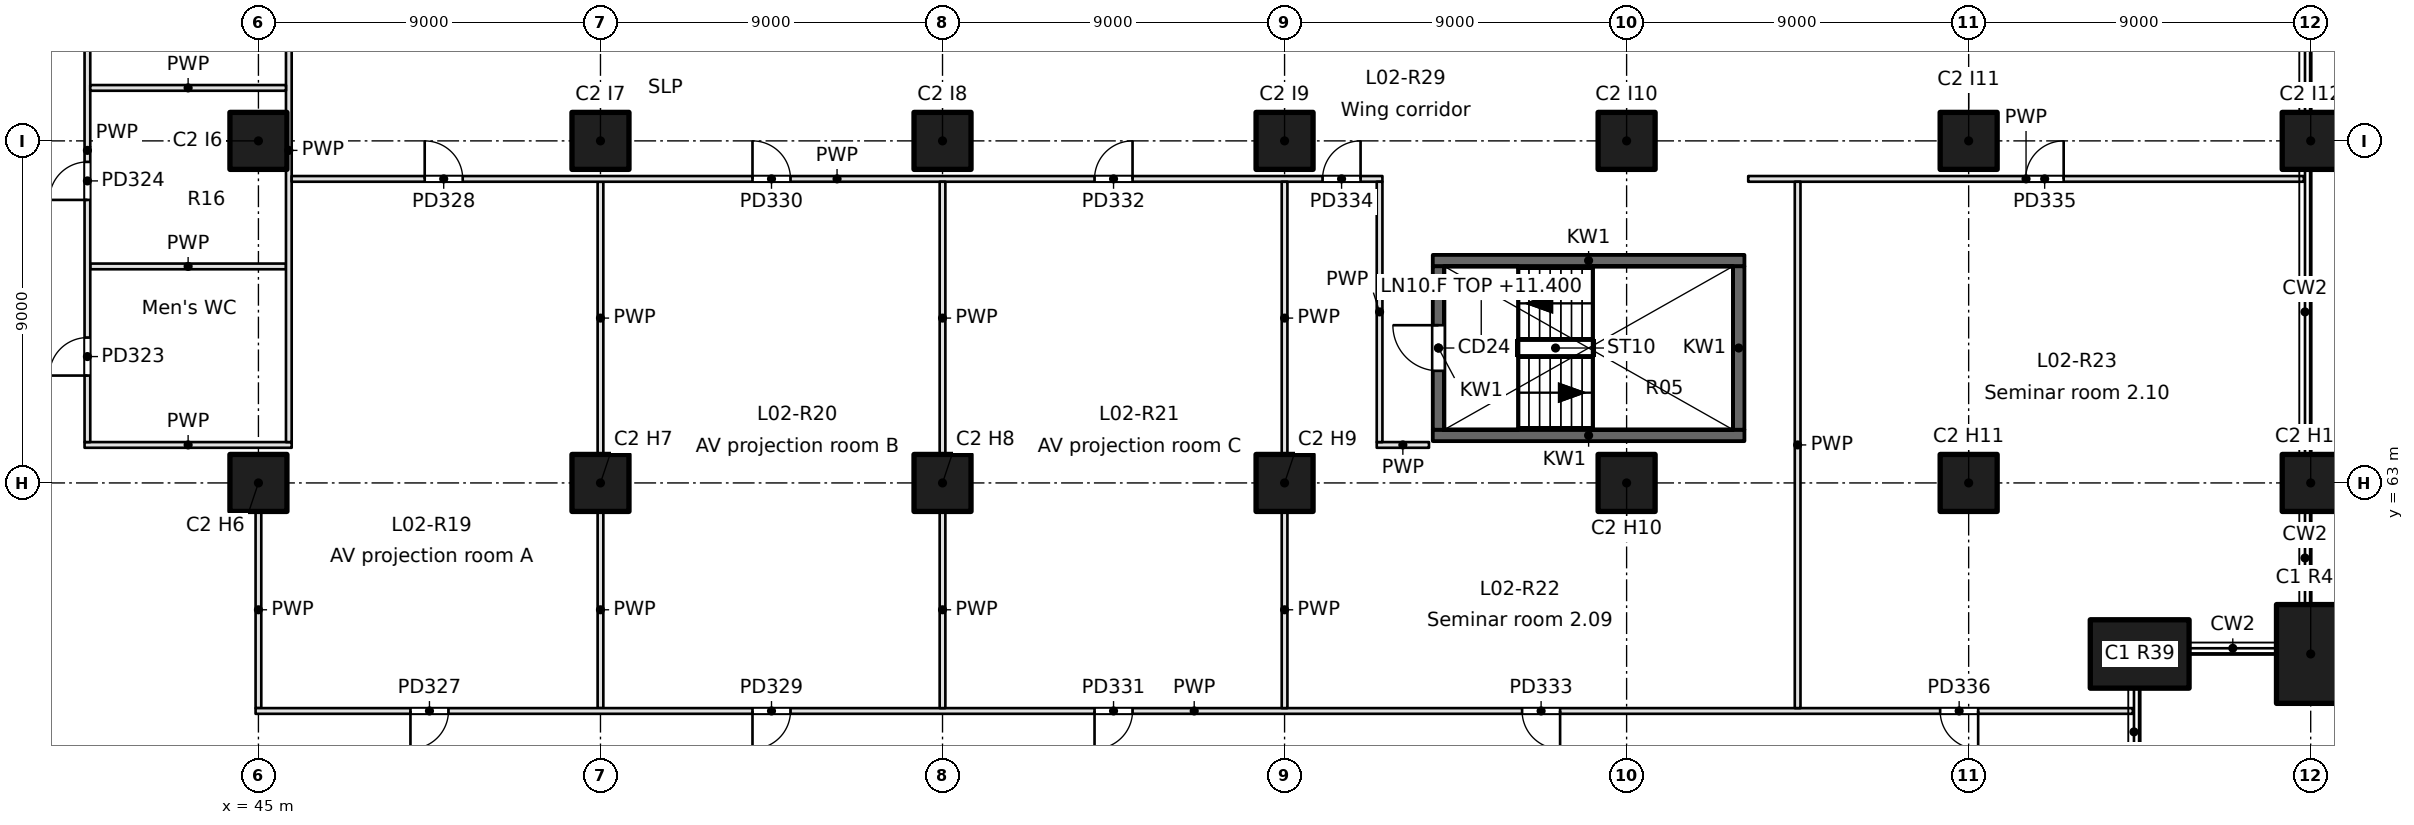
"""IFC4 building model, lengths in metres.
Left out: names, types, materials, properties, quantities, classifications, styles, units other than length and angle.
Written with IfcOpenShell. Run it as: python <this file> out.ifc"""

import sys

from ifc_helpers import new_model, si_unit, direction, frame, frame_2d, origin, origin_2d, place, context, subcontext, project, spatial, rectangle, extrude, element, fill, save


model = new_model("IFC4")
c1 = context("Model", 3, precision=1e-05, world=origin(), true_north=direction((0.0, 1.0)))
c2 = subcontext(c1, "Body", "Model", "MODEL_VIEW")
j1 = project(units=[si_unit("LENGTHUNIT", "METRE"), si_unit("PLANEANGLEUNIT", "RADIAN")], contexts=[c1])
p1 = place(None, origin())
s1 = spatial("IfcSite", under=j1, at=p1, CompositionType="ELEMENT")
p2 = place(p1, origin())
s2 = spatial("IfcBuilding", under=s1, at=p2, CompositionType="ELEMENT")
p3 = place(p2, frame((0.0, 0.0, 11.4)))
s3 = spatial("IfcBuildingStorey", under=s2, at=p3, CompositionType="ELEMENT", Elevation=11.4)
for number, where, z_axis, x_axis in (
    (1, (94.5, 58.5, 0.0), (0.0, 0.0, 1.0), (1.0, 0.0, 0.0)),
    (2, (99.0, 58.5, 0.0), (0.0, 0.0, 1.0), (0.0, 1.0, 0.0)),
):
    element("IfcColumn", number, at=place(p3, frame(where, z_axis=z_axis, x_axis=x_axis)), inside=s3, PredefinedType="COLUMN", context=c2, shape_type="SweptSolid", body=[
        extrude(rectangle(XDim=2.6, YDim=1.8, at=origin_2d()), origin(), (0.0, 0.0, 1.0), 5.4),
    ])
for number, where, z_axis, x_axis in (
    (3, (99.0, 63.0, 0.0), (0.0, 0.0, 1.0), (1.0, 0.0, 0.0)),
    (4, (99.0, 72.0, 0.0), (0.0, 0.0, 1.0), (1.0, 0.0, 0.0)),
    (5, (45.0, 63.0, 0.0), (0.0, 0.0, 1.0), (1.0, 0.0, 0.0)),
    (6, (45.0, 72.0, 0.0), (0.0, 0.0, 1.0), (1.0, 0.0, 0.0)),
    (7, (54.0, 63.0, 0.0), (0.0, 0.0, 1.0), (1.0, 0.0, 0.0)),
    (8, (54.0, 72.0, 0.0), (0.0, 0.0, 1.0), (1.0, 0.0, 0.0)),
    (9, (63.0, 63.0, 0.0), (0.0, 0.0, 1.0), (1.0, 0.0, 0.0)),
    (10, (63.0, 72.0, 0.0), (0.0, 0.0, 1.0), (1.0, 0.0, 0.0)),
    (11, (72.0, 63.0, 0.0), (0.0, 0.0, 1.0), (1.0, 0.0, 0.0)),
    (12, (72.0, 72.0, 0.0), (0.0, 0.0, 1.0), (1.0, 0.0, 0.0)),
    (13, (81.0, 63.0, 0.0), (0.0, 0.0, 1.0), (1.0, 0.0, 0.0)),
    (14, (81.0, 72.0, 0.0), (0.0, 0.0, 1.0), (1.0, 0.0, 0.0)),
    (15, (90.0, 63.0, 0.0), (0.0, 0.0, 1.0), (1.0, 0.0, 0.0)),
    (16, (90.0, 72.0, 0.0), (0.0, 0.0, 1.0), (1.0, 0.0, 0.0)),
):
    element("IfcColumn", number, at=place(p3, frame(where, z_axis=z_axis, x_axis=x_axis)), inside=s3, PredefinedType="COLUMN", context=c2, shape_type="SweptSolid", body=[
        extrude(rectangle(XDim=1.5, YDim=1.5, at=origin_2d()), origin(), (0.0, 0.0, 1.0), 5.4),
    ])
for number, where, z_axis, x_axis in (
    (17, (75.9, 64.25, -0.35), (0.0, 0.0, 1.0), (1.0, 0.0, 0.0)),
    (18, (75.9, 68.85, -0.35), (0.0, 0.0, 1.0), (1.0, 0.0, 0.0)),
):
    element("IfcWall", number, at=place(p3, frame(where, z_axis=z_axis, x_axis=x_axis)), inside=s3, PredefinedType="SOLIDWALL", context=c2, shape_type="SweptSolid", body=[
        extrude(rectangle(XDim=8.2, YDim=0.3, at=frame_2d((4.1, 0.0))), origin(), (0.0, 0.0, 1.0), 5.4),
    ])
p4 = place(p3, frame((76.05, 64.4, -0.35), z_axis=(0.0, 0.0, 1.0), x_axis=(0.0, 1.0, 0.0)))
e19 = element("IfcWall", 19, at=p4, inside=s3, PredefinedType="SOLIDWALL", context=c2, shape_type="SweptSolid", body=[
    extrude(rectangle(XDim=4.3, YDim=0.3, at=frame_2d((2.15, 0.0))), origin(), (0.0, 0.0, 1.0), 5.4),
])
p5 = place(p4, frame((1.55, 0.0, 0.35)))
e20 = element("IfcOpeningElement", 20, at=p5, cuts=e19, PredefinedType="OPENING", context=c2, shape_type="SweptSolid", body=[
    extrude(rectangle(XDim=1.2, YDim=2.1, at=frame_2d((0.6, 1.05))), frame((0.0, 0.15, 0.0), z_axis=(0.0, -1.0, 0.0), x_axis=(1.0, 0.0, 0.0)), (0.0, 0.0, 1.0), 0.3),
])
p6 = place(p3, frame((83.95, 64.4, -0.35), z_axis=(0.0, 0.0, 1.0), x_axis=(0.0, 1.0, 0.0)))
e21 = element("IfcWall", 21, at=p6, inside=s3, PredefinedType="SOLIDWALL", context=c2, shape_type="SweptSolid", body=[
    extrude(rectangle(XDim=4.3, YDim=0.3, at=frame_2d((2.15, 0.0))), origin(), (0.0, 0.0, 1.0), 5.4),
])
p7 = place(p3, frame((45.0, 57.075, 0.0), z_axis=(0.0, 0.0, 1.0), x_axis=(0.0, 1.0, 0.0)))
e22 = element("IfcWall", 22, at=p7, inside=s3, PredefinedType="PARTITIONING", context=c2, shape_type="SweptSolid", body=[
    extrude(rectangle(XDim=5.175, YDim=0.15, at=frame_2d((2.587, 0.0))), origin(), (0.0, 0.0, 1.0), 5.05),
])
p8 = place(p3, frame((40.575, 68.697, 0.0), z_axis=(0.0, 0.0, 1.0), x_axis=(1.0, 0.0, 0.0)))
e23 = element("IfcWall", 23, at=p8, inside=s3, PredefinedType="PARTITIONING", context=c2, shape_type="SweptSolid", body=[
    extrude(rectangle(XDim=5.15, YDim=0.15, at=frame_2d((2.575, 0.0))), origin(), (0.0, 0.0, 1.0), 5.05),
])
p9 = place(p3, frame((45.875, 64.0, 0.0), z_axis=(0.0, 0.0, 1.0), x_axis=(-1.0, 0.0, 0.0)))
e24 = element("IfcWall", 24, at=p9, inside=s3, PredefinedType="PARTITIONING", context=c2, shape_type="SweptSolid", body=[
    extrude(rectangle(XDim=5.45, YDim=0.15, at=frame_2d((2.725, 0.0))), origin(), (0.0, 0.0, 1.0), 5.05),
])
p10 = place(p3, frame((74.425, 64.0, 0.0), z_axis=(0.0, 0.0, 1.0), x_axis=(1.0, 0.0, 0.0)))
e25 = element("IfcWall", 25, at=p10, inside=s3, PredefinedType="PARTITIONING", context=c2, shape_type="SweptSolid", body=[
    extrude(rectangle(XDim=1.375, YDim=0.15, at=frame_2d((0.688, 0.0))), origin(), (0.0, 0.0, 1.0), 5.05),
])
p11 = place(p3, frame((45.8, 79.425, 0.0), z_axis=(0.0, 0.0, 1.0), x_axis=(0.0, -1.0, 0.0)))
e26 = element("IfcWall", 26, at=p11, inside=s3, PredefinedType="PARTITIONING", context=c2, shape_type="SweptSolid", body=[
    extrude(rectangle(XDim=15.35, YDim=0.15, at=frame_2d((7.675, 0.0))), origin(), (0.0, 0.0, 1.0), 5.05),
])
p12 = place(p3, frame((40.5, 64.075, 0.0), z_axis=(0.0, 0.0, 1.0), x_axis=(0.0, 1.0, 0.0)))
e27 = element("IfcWall", 27, at=p12, inside=s3, PredefinedType="PARTITIONING", context=c2, shape_type="SweptSolid", body=[
    extrude(rectangle(XDim=15.35, YDim=0.15, at=frame_2d((7.675, 0.0))), origin(), (0.0, 0.0, 1.0), 5.05),
])
p13 = place(p12, frame((1.75, 0.0, 0.0)))
e28 = element("IfcOpeningElement", 28, at=p13, cuts=e27, PredefinedType="OPENING", context=c2, shape_type="SweptSolid", body=[
    extrude(rectangle(XDim=1.0, YDim=2.1, at=frame_2d((0.5, 1.05))), frame((0.0, 0.075, 0.0), z_axis=(0.0, -1.0, 0.0), x_axis=(1.0, 0.0, 0.0)), (0.0, 0.0, 1.0), 0.15),
])
p14 = place(p12, frame((6.372, 0.0, 0.0)))
e29 = element("IfcOpeningElement", 29, at=p14, cuts=e27, PredefinedType="OPENING", context=c2, shape_type="SweptSolid", body=[
    extrude(rectangle(XDim=1.0, YDim=2.1, at=frame_2d((0.5, 1.05))), frame((0.0, 0.075, 0.0), z_axis=(0.0, -1.0, 0.0), x_axis=(1.0, 0.0, 0.0)), (0.0, 0.0, 1.0), 0.15),
])
p15 = place(p12, frame((10.569, 0.0, 0.0)))
e30 = element("IfcOpeningElement", 30, at=p15, cuts=e27, PredefinedType="OPENING", context=c2, shape_type="SweptSolid", body=[
    extrude(rectangle(XDim=1.0, YDim=2.1, at=frame_2d((0.5, 1.05))), frame((0.0, 0.075, 0.0), z_axis=(0.0, -1.0, 0.0), x_axis=(1.0, 0.0, 0.0)), (0.0, 0.0, 1.0), 0.15),
])
p16 = place(p3, frame((40.575, 73.394, 0.0), z_axis=(0.0, 0.0, 1.0), x_axis=(1.0, 0.0, 0.0)))
e31 = element("IfcWall", 31, at=p16, inside=s3, PredefinedType="PARTITIONING", context=c2, shape_type="SweptSolid", body=[
    extrude(rectangle(XDim=5.15, YDim=0.15, at=frame_2d((2.575, 0.0))), origin(), (0.0, 0.0, 1.0), 5.05),
])
p17 = place(p3, frame((54.0, 57.075, 0.0), z_axis=(0.0, 0.0, 1.0), x_axis=(0.0, 1.0, 0.0)))
e32 = element("IfcWall", 32, at=p17, inside=s3, PredefinedType="PARTITIONING", context=c2, shape_type="SweptSolid", body=[
    extrude(rectangle(XDim=5.175, YDim=0.15, at=frame_2d((2.587, 0.0))), origin(), (0.0, 0.0, 1.0), 5.05),
])
p18 = place(p3, frame((54.0, 63.75, 0.0), z_axis=(0.0, 0.0, 1.0), x_axis=(0.0, 1.0, 0.0)))
e33 = element("IfcWall", 33, at=p18, inside=s3, PredefinedType="PARTITIONING", context=c2, shape_type="SweptSolid", body=[
    extrude(rectangle(XDim=7.175, YDim=0.15, at=frame_2d((3.587, 0.0))), origin(), (0.0, 0.0, 1.0), 5.05),
])
p19 = place(p3, frame((94.32, 57.0, 0.0), z_axis=(0.0, 0.0, 1.0), x_axis=(-1.0, 0.0, 0.0)))
e34 = element("IfcWall", 34, at=p19, inside=s3, PredefinedType="PARTITIONING", context=c2, shape_type="SweptSolid", body=[
    extrude(rectangle(XDim=49.395, YDim=0.15, at=frame_2d((24.698, 0.0))), origin(), (0.0, 0.0, 1.0), 5.05),
])
p20 = place(p19, frame((44.32, 0.0, 0.0)))
e35 = element("IfcOpeningElement", 35, at=p20, cuts=e34, PredefinedType="OPENING", context=c2, shape_type="SweptSolid", body=[
    extrude(rectangle(XDim=1.0, YDim=2.1, at=frame_2d((0.5, 1.05))), frame((0.0, 0.075, 0.0), z_axis=(0.0, -1.0, 0.0), x_axis=(1.0, 0.0, 0.0)), (0.0, 0.0, 1.0), 0.15),
])
p21 = place(p19, frame((35.32, 0.0, 0.0)))
e36 = element("IfcOpeningElement", 36, at=p21, cuts=e34, PredefinedType="OPENING", context=c2, shape_type="SweptSolid", body=[
    extrude(rectangle(XDim=1.0, YDim=2.1, at=frame_2d((0.5, 1.05))), frame((0.0, 0.075, 0.0), z_axis=(0.0, -1.0, 0.0), x_axis=(1.0, 0.0, 0.0)), (0.0, 0.0, 1.0), 0.15),
])
p22 = place(p19, frame((26.32, 0.0, 0.0)))
e37 = element("IfcOpeningElement", 37, at=p22, cuts=e34, PredefinedType="OPENING", context=c2, shape_type="SweptSolid", body=[
    extrude(rectangle(XDim=1.0, YDim=2.1, at=frame_2d((0.5, 1.05))), frame((0.0, 0.075, 0.0), z_axis=(0.0, -1.0, 0.0), x_axis=(1.0, 0.0, 0.0)), (0.0, 0.0, 1.0), 0.15),
])
p23 = place(p19, frame((15.07, 0.0, 0.0)))
e38 = element("IfcOpeningElement", 38, at=p23, cuts=e34, PredefinedType="OPENING", context=c2, shape_type="SweptSolid", body=[
    extrude(rectangle(XDim=1.0, YDim=2.1, at=frame_2d((0.5, 1.05))), frame((0.0, 0.075, 0.0), z_axis=(0.0, -1.0, 0.0), x_axis=(1.0, 0.0, 0.0)), (0.0, 0.0, 1.0), 0.15),
])
p24 = place(p19, frame((4.07, 0.0, 0.0)))
e39 = element("IfcOpeningElement", 39, at=p24, cuts=e34, PredefinedType="OPENING", context=c2, shape_type="SweptSolid", body=[
    extrude(rectangle(XDim=1.0, YDim=2.1, at=frame_2d((0.5, 1.05))), frame((0.0, 0.075, 0.0), z_axis=(0.0, -1.0, 0.0), x_axis=(1.0, 0.0, 0.0)), (0.0, 0.0, 1.0), 0.15),
])
p25 = place(p3, frame((45.875, 71.0, 0.0), z_axis=(0.0, 0.0, 1.0), x_axis=(1.0, 0.0, 0.0)))
e40 = element("IfcWall", 40, at=p25, inside=s3, PredefinedType="PARTITIONING", context=c2, shape_type="SweptSolid", body=[
    extrude(rectangle(XDim=28.7, YDim=0.15, at=frame_2d((14.35, 0.0))), origin(), (0.0, 0.0, 1.0), 5.05),
])
p26 = place(p25, frame((3.5, 0.0, 0.0)))
e41 = element("IfcOpeningElement", 41, at=p26, cuts=e40, PredefinedType="OPENING", context=c2, shape_type="SweptSolid", body=[
    extrude(rectangle(XDim=1.0, YDim=2.1, at=frame_2d((0.5, 1.05))), frame((0.0, 0.075, 0.0), z_axis=(0.0, -1.0, 0.0), x_axis=(1.0, 0.0, 0.0)), (0.0, 0.0, 1.0), 0.15),
])
p27 = place(p25, frame((12.125, 0.0, 0.0)))
e42 = element("IfcOpeningElement", 42, at=p27, cuts=e40, PredefinedType="OPENING", context=c2, shape_type="SweptSolid", body=[
    extrude(rectangle(XDim=1.0, YDim=2.1, at=frame_2d((0.5, 1.05))), frame((0.0, 0.075, 0.0), z_axis=(0.0, -1.0, 0.0), x_axis=(1.0, 0.0, 0.0)), (0.0, 0.0, 1.0), 0.15),
])
p28 = place(p25, frame((21.125, 0.0, 0.0)))
e43 = element("IfcOpeningElement", 43, at=p28, cuts=e40, PredefinedType="OPENING", context=c2, shape_type="SweptSolid", body=[
    extrude(rectangle(XDim=1.0, YDim=2.1, at=frame_2d((0.5, 1.05))), frame((0.0, 0.075, 0.0), z_axis=(0.0, -1.0, 0.0), x_axis=(1.0, 0.0, 0.0)), (0.0, 0.0, 1.0), 0.15),
])
p29 = place(p25, frame((27.125, 0.0, 0.0)))
e44 = element("IfcOpeningElement", 44, at=p29, cuts=e40, PredefinedType="OPENING", context=c2, shape_type="SweptSolid", body=[
    extrude(rectangle(XDim=1.0, YDim=2.1, at=frame_2d((0.5, 1.05))), frame((0.0, 0.075, 0.0), z_axis=(0.0, -1.0, 0.0), x_axis=(1.0, 0.0, 0.0)), (0.0, 0.0, 1.0), 0.15),
])
p30 = place(p3, frame((84.2, 71.0, 0.0), z_axis=(0.0, 0.0, 1.0), x_axis=(1.0, 0.0, 0.0)))
e45 = element("IfcWall", 45, at=p30, inside=s3, PredefinedType="PARTITIONING", context=c2, shape_type="SweptSolid", body=[
    extrude(rectangle(XDim=14.62, YDim=0.15, at=frame_2d((7.31, 0.0))), origin(), (0.0, 0.0, 1.0), 5.05),
])
p31 = place(p30, frame((7.3, 0.0, 0.0)))
e46 = element("IfcOpeningElement", 46, at=p31, cuts=e45, PredefinedType="OPENING", context=c2, shape_type="SweptSolid", body=[
    extrude(rectangle(XDim=1.0, YDim=2.1, at=frame_2d((0.5, 1.05))), frame((0.0, 0.075, 0.0), z_axis=(0.0, -1.0, 0.0), x_axis=(1.0, 0.0, 0.0)), (0.0, 0.0, 1.0), 0.15),
])
p32 = place(p3, frame((63.0, 57.075, 0.0), z_axis=(0.0, 0.0, 1.0), x_axis=(0.0, 1.0, 0.0)))
e47 = element("IfcWall", 47, at=p32, inside=s3, PredefinedType="PARTITIONING", context=c2, shape_type="SweptSolid", body=[
    extrude(rectangle(XDim=5.175, YDim=0.15, at=frame_2d((2.587, 0.0))), origin(), (0.0, 0.0, 1.0), 5.05),
])
p33 = place(p3, frame((63.0, 63.75, 0.0), z_axis=(0.0, 0.0, 1.0), x_axis=(0.0, 1.0, 0.0)))
e48 = element("IfcWall", 48, at=p33, inside=s3, PredefinedType="PARTITIONING", context=c2, shape_type="SweptSolid", body=[
    extrude(rectangle(XDim=7.175, YDim=0.15, at=frame_2d((3.587, 0.0))), origin(), (0.0, 0.0, 1.0), 5.05),
])
p34 = place(p3, frame((72.0, 57.075, 0.0), z_axis=(0.0, 0.0, 1.0), x_axis=(0.0, 1.0, 0.0)))
e49 = element("IfcWall", 49, at=p34, inside=s3, PredefinedType="PARTITIONING", context=c2, shape_type="SweptSolid", body=[
    extrude(rectangle(XDim=5.175, YDim=0.15, at=frame_2d((2.587, 0.0))), origin(), (0.0, 0.0, 1.0), 5.05),
])
p35 = place(p3, frame((72.0, 63.75, 0.0), z_axis=(0.0, 0.0, 1.0), x_axis=(0.0, 1.0, 0.0)))
e50 = element("IfcWall", 50, at=p35, inside=s3, PredefinedType="PARTITIONING", context=c2, shape_type="SweptSolid", body=[
    extrude(rectangle(XDim=7.175, YDim=0.15, at=frame_2d((3.587, 0.0))), origin(), (0.0, 0.0, 1.0), 5.05),
])
p36 = place(p3, frame((85.5, 57.075, 0.0), z_axis=(0.0, 0.0, 1.0), x_axis=(0.0, 1.0, 0.0)))
e51 = element("IfcWall", 51, at=p36, inside=s3, PredefinedType="PARTITIONING", context=c2, shape_type="SweptSolid", body=[
    extrude(rectangle(XDim=13.85, YDim=0.15, at=frame_2d((6.925, 0.0))), origin(), (0.0, 0.0, 1.0), 5.05),
])
p37 = place(p3, frame((74.5, 70.925, 0.0), z_axis=(0.0, 0.0, 1.0), x_axis=(0.0, -1.0, 0.0)))
e52 = element("IfcWall", 52, at=p37, inside=s3, PredefinedType="PARTITIONING", context=c2, shape_type="SweptSolid", body=[
    extrude(rectangle(XDim=6.85, YDim=0.15, at=frame_2d((3.425, 0.0))), origin(), (0.0, 0.0, 1.0), 5.05),
])
p38 = place(p5, origin())
e53 = element("IfcDoor", 53, at=p38, inside=s3, OperationType="SINGLE_SWING_RIGHT", PredefinedType="DOOR", context=c2, shape_type="SweptSolid", body=[
    extrude(rectangle(XDim=1.2, YDim=2.1, at=frame_2d((0.6, 1.05))), frame((0.0, 0.025, 0.0), z_axis=(0.0, -1.0, 0.0), x_axis=(1.0, 0.0, 0.0)), (0.0, 0.0, 1.0), 0.05),
])
fill(e20, e53)
p39 = place(p13, origin())
e54 = element("IfcDoor", 54, at=p39, inside=s3, OperationType="SINGLE_SWING_LEFT", PredefinedType="DOOR", context=c2, shape_type="SweptSolid", body=[
    extrude(rectangle(XDim=1.0, YDim=2.1, at=frame_2d((0.5, 1.05))), frame((0.0, 0.025, 0.0), z_axis=(0.0, -1.0, 0.0), x_axis=(1.0, 0.0, 0.0)), (0.0, 0.0, 1.0), 0.05),
])
fill(e28, e54)
p40 = place(p14, origin())
e55 = element("IfcDoor", 55, at=p40, inside=s3, OperationType="SINGLE_SWING_LEFT", PredefinedType="DOOR", context=c2, shape_type="SweptSolid", body=[
    extrude(rectangle(XDim=1.0, YDim=2.1, at=frame_2d((0.5, 1.05))), frame((0.0, 0.025, 0.0), z_axis=(0.0, -1.0, 0.0), x_axis=(1.0, 0.0, 0.0)), (0.0, 0.0, 1.0), 0.05),
])
fill(e29, e55)
p41 = place(p20, origin())
e56 = element("IfcDoor", 56, at=p41, inside=s3, OperationType="SINGLE_SWING_RIGHT", PredefinedType="DOOR", context=c2, shape_type="SweptSolid", body=[
    extrude(rectangle(XDim=1.0, YDim=2.1, at=frame_2d((0.5, 1.05))), frame((0.0, 0.025, 0.0), z_axis=(0.0, -1.0, 0.0), x_axis=(1.0, 0.0, 0.0)), (0.0, 0.0, 1.0), 0.05),
])
fill(e35, e56)
p42 = place(p26, origin())
e57 = element("IfcDoor", 57, at=p42, inside=s3, OperationType="SINGLE_SWING_LEFT", PredefinedType="DOOR", context=c2, shape_type="SweptSolid", body=[
    extrude(rectangle(XDim=1.0, YDim=2.1, at=frame_2d((0.5, 1.05))), frame((0.0, 0.025, 0.0), z_axis=(0.0, -1.0, 0.0), x_axis=(1.0, 0.0, 0.0)), (0.0, 0.0, 1.0), 0.05),
])
fill(e41, e57)
p43 = place(p21, origin())
e58 = element("IfcDoor", 58, at=p43, inside=s3, OperationType="SINGLE_SWING_RIGHT", PredefinedType="DOOR", context=c2, shape_type="SweptSolid", body=[
    extrude(rectangle(XDim=1.0, YDim=2.1, at=frame_2d((0.5, 1.05))), frame((0.0, 0.025, 0.0), z_axis=(0.0, -1.0, 0.0), x_axis=(1.0, 0.0, 0.0)), (0.0, 0.0, 1.0), 0.05),
])
fill(e36, e58)
p44 = place(p27, origin())
e59 = element("IfcDoor", 59, at=p44, inside=s3, OperationType="SINGLE_SWING_LEFT", PredefinedType="DOOR", context=c2, shape_type="SweptSolid", body=[
    extrude(rectangle(XDim=1.0, YDim=2.1, at=frame_2d((0.5, 1.05))), frame((0.0, 0.025, 0.0), z_axis=(0.0, -1.0, 0.0), x_axis=(1.0, 0.0, 0.0)), (0.0, 0.0, 1.0), 0.05),
])
fill(e42, e59)
p45 = place(p22, origin())
e60 = element("IfcDoor", 60, at=p45, inside=s3, OperationType="SINGLE_SWING_RIGHT", PredefinedType="DOOR", context=c2, shape_type="SweptSolid", body=[
    extrude(rectangle(XDim=1.0, YDim=2.1, at=frame_2d((0.5, 1.05))), frame((0.0, 0.025, 0.0), z_axis=(0.0, -1.0, 0.0), x_axis=(1.0, 0.0, 0.0)), (0.0, 0.0, 1.0), 0.05),
])
fill(e37, e60)
p46 = place(p28, origin())
e61 = element("IfcDoor", 61, at=p46, inside=s3, OperationType="SINGLE_SWING_RIGHT", PredefinedType="DOOR", context=c2, shape_type="SweptSolid", body=[
    extrude(rectangle(XDim=1.0, YDim=2.1, at=frame_2d((0.5, 1.05))), frame((0.0, 0.025, 0.0), z_axis=(0.0, -1.0, 0.0), x_axis=(1.0, 0.0, 0.0)), (0.0, 0.0, 1.0), 0.05),
])
fill(e43, e61)
p47 = place(p23, origin())
e62 = element("IfcDoor", 62, at=p47, inside=s3, OperationType="SINGLE_SWING_LEFT", PredefinedType="DOOR", context=c2, shape_type="SweptSolid", body=[
    extrude(rectangle(XDim=1.0, YDim=2.1, at=frame_2d((0.5, 1.05))), frame((0.0, 0.025, 0.0), z_axis=(0.0, -1.0, 0.0), x_axis=(1.0, 0.0, 0.0)), (0.0, 0.0, 1.0), 0.05),
])
fill(e38, e62)
p48 = place(p29, origin())
e63 = element("IfcDoor", 63, at=p48, inside=s3, OperationType="SINGLE_SWING_RIGHT", PredefinedType="DOOR", context=c2, shape_type="SweptSolid", body=[
    extrude(rectangle(XDim=1.0, YDim=2.1, at=frame_2d((0.5, 1.05))), frame((0.0, 0.025, 0.0), z_axis=(0.0, -1.0, 0.0), x_axis=(1.0, 0.0, 0.0)), (0.0, 0.0, 1.0), 0.05),
])
fill(e44, e63)
p49 = place(p31, origin())
e64 = element("IfcDoor", 64, at=p49, inside=s3, OperationType="SINGLE_SWING_RIGHT", PredefinedType="DOOR", context=c2, shape_type="SweptSolid", body=[
    extrude(rectangle(XDim=1.0, YDim=2.1, at=frame_2d((0.5, 1.05))), frame((0.0, 0.025, 0.0), z_axis=(0.0, -1.0, 0.0), x_axis=(1.0, 0.0, 0.0)), (0.0, 0.0, 1.0), 0.05),
])
fill(e46, e64)
p50 = place(p24, origin())
e65 = element("IfcDoor", 65, at=p50, inside=s3, OperationType="SINGLE_SWING_LEFT", PredefinedType="DOOR", context=c2, shape_type="SweptSolid", body=[
    extrude(rectangle(XDim=1.0, YDim=2.1, at=frame_2d((0.5, 1.05))), frame((0.0, 0.025, 0.0), z_axis=(0.0, -1.0, 0.0), x_axis=(1.0, 0.0, 0.0)), (0.0, 0.0, 1.0), 0.05),
])
fill(e39, e65)
save(model, sys.argv[1])
